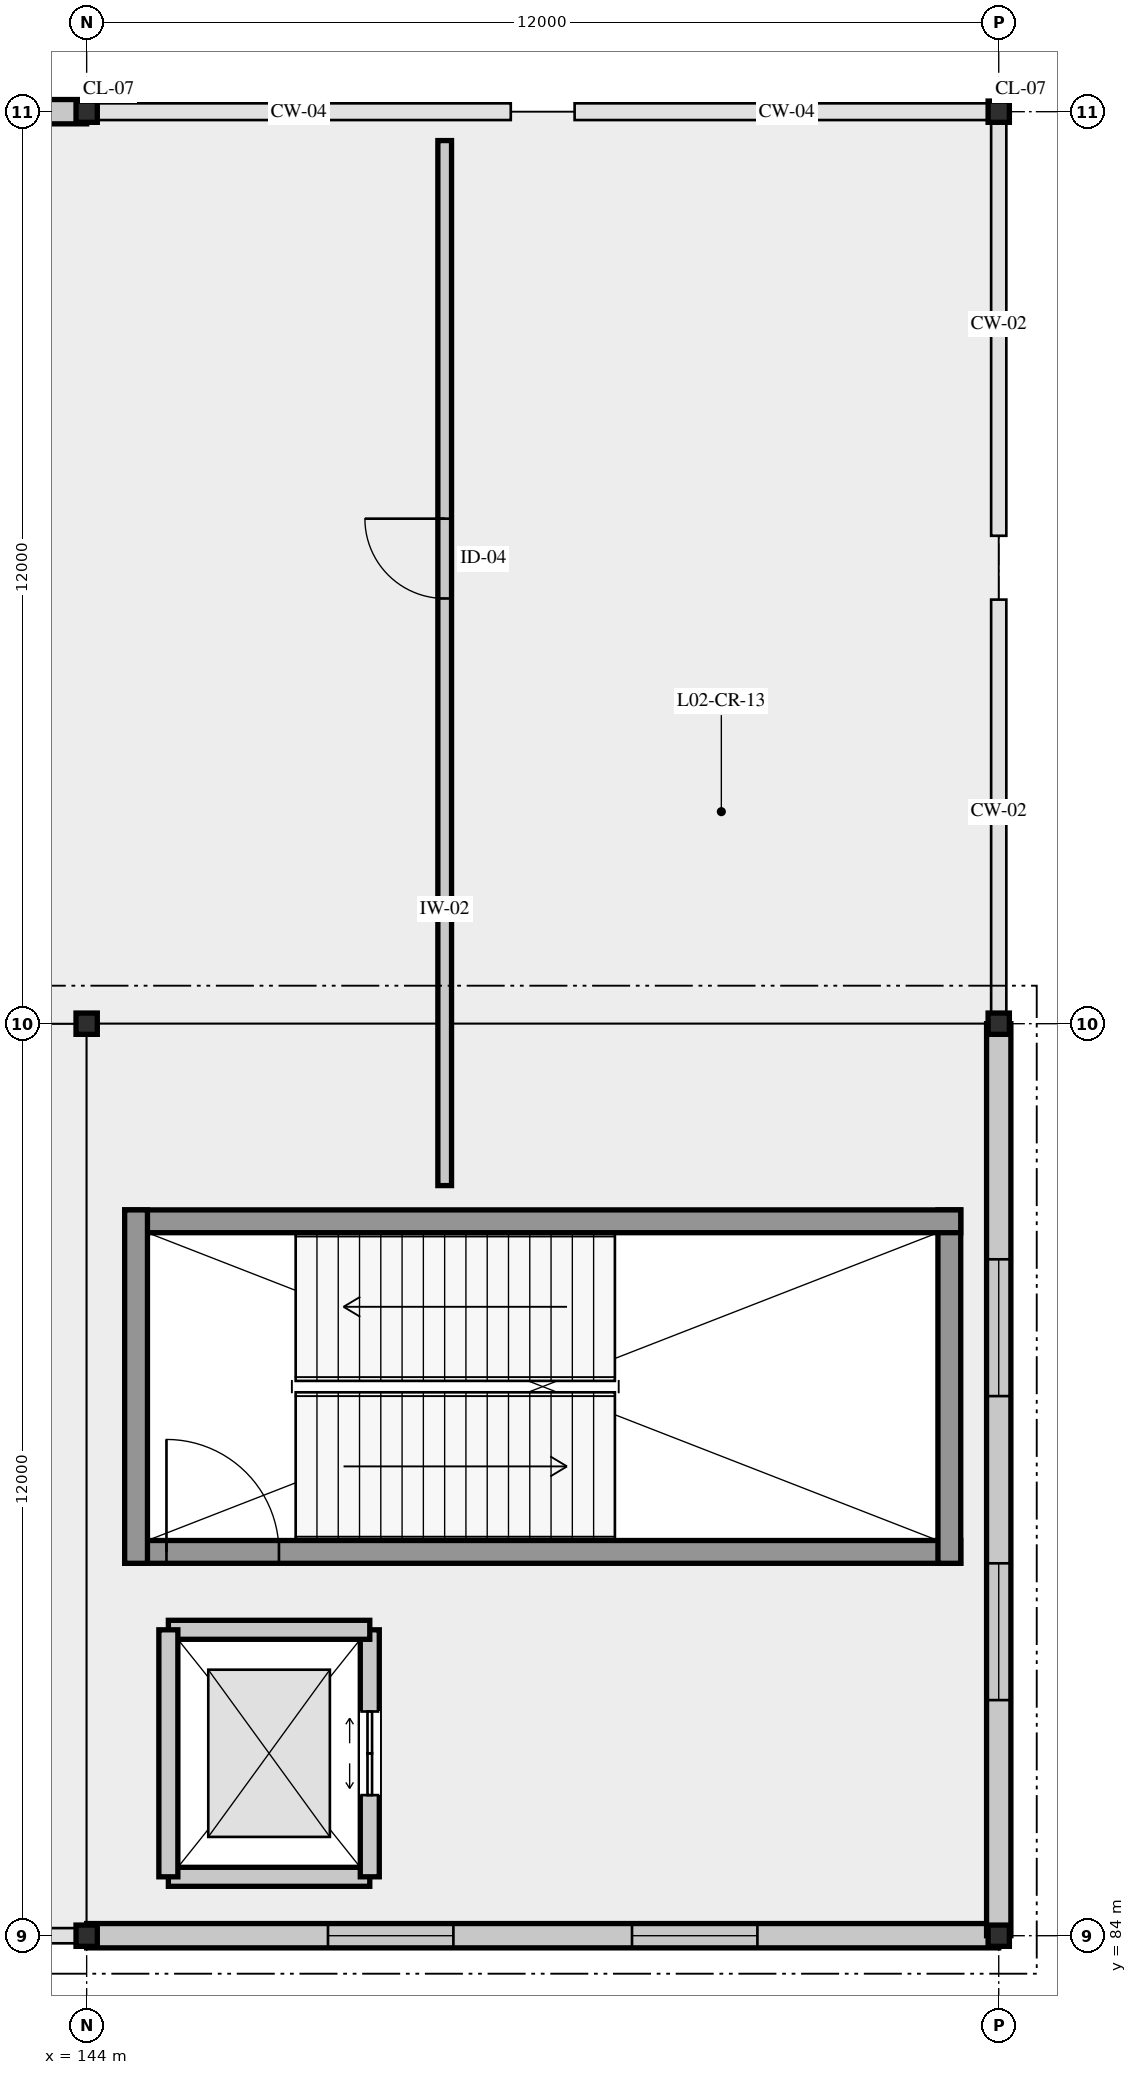
"""IFC4 building model, lengths in metres.
Left out: names, types, materials, properties, quantities, classifications, styles, units other than length and angle.
Written with IfcOpenShell. Run it as: python <this file> out.ifc"""

import sys

from ifc_helpers import new_model, si_unit, direction, frame, frame_2d, origin, origin_2d, place, context, subcontext, project, spatial, rectangle, i_section, extrude, element, fill, save


model = new_model("IFC4")
c1 = context("Model", 3, precision=1e-05, world=origin(), true_north=direction((0.0, 1.0)))
c2 = subcontext(c1, "Body", "Model", "MODEL_VIEW")
j1 = project(units=[si_unit("LENGTHUNIT", "METRE"), si_unit("PLANEANGLEUNIT", "RADIAN")], contexts=[c1])
p1 = place(None, origin())
s1 = spatial("IfcSite", under=j1, at=p1, CompositionType="ELEMENT")
p2 = place(p1, origin())
s2 = spatial("IfcBuilding", under=s1, at=p2, CompositionType="ELEMENT")
p3 = place(p2, frame((0.0, 0.0, 10.8)))
s3 = spatial("IfcBuildingStorey", under=s2, at=p3, CompositionType="ELEMENT", Elevation=10.8)
for number, where, z_axis, x_axis in (
    (1, (144.0, 84.0, 0.0), (0.0, 0.0, 1.0), (1.0, 0.0, 0.0)),
    (2, (144.0, 96.0, 0.0), (0.0, 0.0, 1.0), (1.0, 0.0, 0.0)),
    (3, (144.0, 108.0, 0.0), (0.0, 0.0, 1.0), (1.0, 0.0, 0.0)),
    (4, (156.0, 84.0, 0.0), (0.0, 0.0, 1.0), (1.0, 0.0, 0.0)),
    (5, (156.0, 96.0, 0.0), (0.0, 0.0, 1.0), (1.0, 0.0, 0.0)),
    (6, (156.0, 108.0, 0.0), (0.0, 0.0, 1.0), (1.0, 0.0, 0.0)),
):
    element("IfcColumn", number, at=place(p3, frame(where, z_axis=z_axis, x_axis=x_axis)), inside=s3, PredefinedType="COLUMN", context=c2, shape_type="SweptSolid", body=[
        extrude(i_section(OverallWidth=0.28, OverallDepth=0.28, WebThickness=0.01, FlangeThickness=0.018, FilletRadius=0.024, at=origin_2d()), origin(), (0.0, 0.0, 1.0), 6.0),
    ])
p4 = place(p3, frame((144.0, 108.0, 0.0), z_axis=(0.0, 0.0, 1.0), x_axis=(-1.0, 0.0, 0.0)))
e7 = element("IfcWall", 7, at=p4, inside=s3, PredefinedType="SOLIDWALL", context=c2, shape_type="SweptSolid", body=[
    extrude(rectangle(XDim=12.0, YDim=0.32, at=frame_2d((6.0, 0.0))), origin(), (0.0, 0.0, 1.0), 5.11),
])
p5 = place(p4, frame((3.25, 0.0, 0.95)))
e8 = element("IfcOpeningElement", 8, at=p5, cuts=e7, PredefinedType="OPENING", context=c2, shape_type="SweptSolid", body=[
    extrude(rectangle(XDim=1.5, YDim=1.5, at=frame_2d((0.75, 0.75))), frame((0.0, 0.17, 0.0), z_axis=(0.0, -1.0, 0.0), x_axis=(1.0, 0.0, 0.0)), (0.0, 0.0, 1.0), 0.34),
])
p6 = place(p4, frame((7.25, 0.0, 0.95)))
e9 = element("IfcOpeningElement", 9, at=p6, cuts=e7, PredefinedType="OPENING", context=c2, shape_type="SweptSolid", body=[
    extrude(rectangle(XDim=1.5, YDim=1.5, at=frame_2d((0.75, 0.75))), frame((0.0, 0.17, 0.0), z_axis=(0.0, -1.0, 0.0), x_axis=(1.0, 0.0, 0.0)), (0.0, 0.0, 1.0), 0.34),
])
p7 = place(p3, frame((144.0, 84.0, 0.0), z_axis=(0.0, 0.0, 1.0), x_axis=(1.0, 0.0, 0.0)))
e10 = element("IfcWall", 10, at=p7, inside=s3, PredefinedType="SOLIDWALL", context=c2, shape_type="SweptSolid", body=[
    extrude(rectangle(XDim=12.0, YDim=0.32, at=frame_2d((6.0, 0.0))), origin(), (0.0, 0.0, 1.0), 5.11),
])
p8 = place(p7, frame((3.175, 0.0, 0.95)))
e11 = element("IfcOpeningElement", 11, at=p8, cuts=e10, PredefinedType="OPENING", context=c2, shape_type="SweptSolid", body=[
    extrude(rectangle(XDim=1.65, YDim=1.5, at=frame_2d((0.825, 0.75))), frame((0.0, 0.17, 0.0), z_axis=(0.0, -1.0, 0.0), x_axis=(1.0, 0.0, 0.0)), (0.0, 0.0, 1.0), 0.34),
])
p9 = place(p7, frame((7.175, 0.0, 0.95)))
e12 = element("IfcOpeningElement", 12, at=p9, cuts=e10, PredefinedType="OPENING", context=c2, shape_type="SweptSolid", body=[
    extrude(rectangle(XDim=1.65, YDim=1.5, at=frame_2d((0.825, 0.75))), frame((0.0, 0.17, 0.0), z_axis=(0.0, -1.0, 0.0), x_axis=(1.0, 0.0, 0.0)), (0.0, 0.0, 1.0), 0.34),
])
p10 = place(p3, frame((156.0, 84.0, 0.0), z_axis=(0.0, 0.0, 1.0), x_axis=(0.0, 1.0, 0.0)))
e13 = element("IfcWall", 13, at=p10, inside=s3, PredefinedType="SOLIDWALL", context=c2, shape_type="SweptSolid", body=[
    extrude(rectangle(XDim=12.0, YDim=0.32, at=frame_2d((6.0, 0.0))), origin(), (0.0, 0.0, 1.0), 5.11),
])
p11 = place(p10, frame((3.1, 0.0, 0.95)))
e14 = element("IfcOpeningElement", 14, at=p11, cuts=e13, PredefinedType="OPENING", context=c2, shape_type="SweptSolid", body=[
    extrude(rectangle(XDim=1.8, YDim=1.5, at=frame_2d((0.9, 0.75))), frame((0.0, 0.17, 0.0), z_axis=(0.0, -1.0, 0.0), x_axis=(1.0, 0.0, 0.0)), (0.0, 0.0, 1.0), 0.34),
])
p12 = place(p10, frame((7.1, 0.0, 0.95)))
e15 = element("IfcOpeningElement", 15, at=p12, cuts=e13, PredefinedType="OPENING", context=c2, shape_type="SweptSolid", body=[
    extrude(rectangle(XDim=1.8, YDim=1.5, at=frame_2d((0.9, 0.75))), frame((0.0, 0.17, 0.0), z_axis=(0.0, -1.0, 0.0), x_axis=(1.0, 0.0, 0.0)), (0.0, 0.0, 1.0), 0.34),
])
p13 = place(p3, frame((144.5, 89.05, 0.0), z_axis=(0.0, 0.0, 1.0), x_axis=(1.0, 0.0, 0.0)))
e16 = element("IfcWall", 16, at=p13, inside=s3, PredefinedType="SHEAR", context=c2, shape_type="SweptSolid", body=[
    extrude(rectangle(XDim=11.0, YDim=0.3, at=frame_2d((5.5, 0.0))), origin(), (0.0, 0.0, 1.0), 5.69),
])
p14 = place(p13, frame((0.55, 0.0, 0.0)))
e17 = element("IfcOpeningElement", 17, at=p14, cuts=e16, PredefinedType="OPENING", context=c2, shape_type="SweptSolid", body=[
    extrude(rectangle(XDim=1.48, YDim=2.3, at=frame_2d((0.74, 1.15))), frame((0.0, 0.16, 0.0), z_axis=(0.0, -1.0, 0.0), x_axis=(1.0, 0.0, 0.0)), (0.0, 0.0, 1.0), 0.32),
])
p15 = place(p3, frame((155.35, 88.9, 0.0), z_axis=(0.0, 0.0, 1.0), x_axis=(0.0, 1.0, 0.0)))
e18 = element("IfcWall", 18, at=p15, inside=s3, PredefinedType="SHEAR", context=c2, shape_type="SweptSolid", body=[
    extrude(rectangle(XDim=4.65, YDim=0.3, at=frame_2d((2.325, 0.0))), origin(), (0.0, 0.0, 1.0), 5.69),
])
p16 = place(p3, frame((155.5, 93.4, 0.0), z_axis=(0.0, 0.0, 1.0), x_axis=(-1.0, 0.0, 0.0)))
e19 = element("IfcWall", 19, at=p16, inside=s3, PredefinedType="SHEAR", context=c2, shape_type="SweptSolid", body=[
    extrude(rectangle(XDim=11.0, YDim=0.3, at=frame_2d((5.5, 0.0))), origin(), (0.0, 0.0, 1.0), 5.69),
])
p17 = place(p3, frame((144.65, 93.55, 0.0), z_axis=(0.0, 0.0, 1.0), x_axis=(0.0, -1.0, 0.0)))
e20 = element("IfcWall", 20, at=p17, inside=s3, PredefinedType="SHEAR", context=c2, shape_type="SweptSolid", body=[
    extrude(rectangle(XDim=4.65, YDim=0.3, at=frame_2d((2.325, 0.0))), origin(), (0.0, 0.0, 1.0), 5.69),
])
p18 = place(p3, frame((145.075, 84.775, 0.0), z_axis=(0.0, 0.0, 1.0), x_axis=(1.0, 0.0, 0.0)))
e21 = element("IfcWall", 21, at=p18, inside=s3, PredefinedType="SOLIDWALL", context=c2, shape_type="SweptSolid", body=[
    extrude(rectangle(XDim=2.65, YDim=0.25, at=frame_2d((1.325, 0.0))), origin(), (0.0, 0.0, 1.0), 5.69),
])
p19 = place(p3, frame((147.725, 84.775, 0.0), z_axis=(0.0, 0.0, 1.0), x_axis=(0.0, 1.0, 0.0)))
e22 = element("IfcWall", 22, at=p19, inside=s3, PredefinedType="SOLIDWALL", context=c2, shape_type="SweptSolid", body=[
    extrude(rectangle(XDim=3.25, YDim=0.25, at=frame_2d((1.625, 0.0))), origin(), (0.0, 0.0, 1.0), 5.69),
])
p20 = place(p19, frame((1.075, 0.0, 0.0)))
e23 = element("IfcOpeningElement", 23, at=p20, cuts=e22, PredefinedType="OPENING", context=c2, shape_type="SweptSolid", body=[
    extrude(rectangle(XDim=1.1, YDim=2.2, at=frame_2d((0.55, 1.1))), frame((0.0, 0.135, 0.0), z_axis=(0.0, -1.0, 0.0), x_axis=(1.0, 0.0, 0.0)), (0.0, 0.0, 1.0), 0.27),
])
p21 = place(p3, frame((147.725, 88.025, 0.0), z_axis=(0.0, 0.0, 1.0), x_axis=(-1.0, 0.0, 0.0)))
e24 = element("IfcWall", 24, at=p21, inside=s3, PredefinedType="SOLIDWALL", context=c2, shape_type="SweptSolid", body=[
    extrude(rectangle(XDim=2.65, YDim=0.25, at=frame_2d((1.325, 0.0))), origin(), (0.0, 0.0, 1.0), 5.69),
])
p22 = place(p3, frame((145.075, 88.025, 0.0), z_axis=(0.0, 0.0, 1.0), x_axis=(0.0, -1.0, 0.0)))
e25 = element("IfcWall", 25, at=p22, inside=s3, PredefinedType="SOLIDWALL", context=c2, shape_type="SweptSolid", body=[
    extrude(rectangle(XDim=3.25, YDim=0.25, at=frame_2d((1.625, 0.0))), origin(), (0.0, 0.0, 1.0), 5.69),
])
p23 = place(p3, frame((148.711, 93.87, 0.0), z_axis=(0.0, 0.0, 1.0), x_axis=(0.0, 1.0, 0.0)))
e26 = element("IfcWall", 26, at=p23, inside=s3, PredefinedType="PARTITIONING", context=c2, shape_type="SweptSolid", body=[
    extrude(rectangle(XDim=13.75, YDim=0.18, at=frame_2d((6.875, 0.0))), origin(), (0.0, 0.0, 1.0), 5.18),
])
p24 = place(p23, frame((7.725, 0.0, 0.0)))
e27 = element("IfcOpeningElement", 27, at=p24, cuts=e26, PredefinedType="OPENING", context=c2, shape_type="SweptSolid", body=[
    extrude(rectangle(XDim=1.05, YDim=2.2, at=frame_2d((0.525, 1.1))), frame((0.0, 0.1, 0.0), z_axis=(0.0, -1.0, 0.0), x_axis=(1.0, 0.0, 0.0)), (0.0, 0.0, 1.0), 0.2),
])
p25 = place(p8, origin())
e28 = element("IfcWindow", 28, at=p25, inside=s3, PartitioningType="SINGLE_PANEL", PredefinedType="WINDOW", context=c2, shape_type="SweptSolid", body=[
    extrude(rectangle(XDim=1.65, YDim=1.5, at=frame_2d((0.825, 0.75))), frame((0.0, 0.03, 0.0), z_axis=(0.0, -1.0, 0.0), x_axis=(1.0, 0.0, 0.0)), (0.0, 0.0, 1.0), 0.06),
])
fill(e11, e28)
p26 = place(p9, origin())
e29 = element("IfcWindow", 29, at=p26, inside=s3, PartitioningType="SINGLE_PANEL", PredefinedType="WINDOW", context=c2, shape_type="SweptSolid", body=[
    extrude(rectangle(XDim=1.65, YDim=1.5, at=frame_2d((0.825, 0.75))), frame((0.0, 0.03, 0.0), z_axis=(0.0, -1.0, 0.0), x_axis=(1.0, 0.0, 0.0)), (0.0, 0.0, 1.0), 0.06),
])
fill(e12, e29)
p27 = place(p11, origin())
e30 = element("IfcWindow", 30, at=p27, inside=s3, PartitioningType="SINGLE_PANEL", PredefinedType="WINDOW", context=c2, shape_type="SweptSolid", body=[
    extrude(rectangle(XDim=1.8, YDim=1.5, at=frame_2d((0.9, 0.75))), frame((0.0, 0.03, 0.0), z_axis=(0.0, -1.0, 0.0), x_axis=(1.0, 0.0, 0.0)), (0.0, 0.0, 1.0), 0.06),
])
fill(e14, e30)
p28 = place(p12, origin())
e31 = element("IfcWindow", 31, at=p28, inside=s3, PartitioningType="SINGLE_PANEL", PredefinedType="WINDOW", context=c2, shape_type="SweptSolid", body=[
    extrude(rectangle(XDim=1.8, YDim=1.5, at=frame_2d((0.9, 0.75))), frame((0.0, 0.03, 0.0), z_axis=(0.0, -1.0, 0.0), x_axis=(1.0, 0.0, 0.0)), (0.0, 0.0, 1.0), 0.06),
])
fill(e15, e31)
p29 = place(p14, origin())
e32 = element("IfcDoor", 32, at=p29, inside=s3, OperationType="DOUBLE_DOOR_SINGLE_SWING", PredefinedType="DOOR", context=c2, shape_type="SweptSolid", body=[
    extrude(rectangle(XDim=1.48, YDim=2.3, at=frame_2d((0.74, 1.15))), frame((0.0, 0.025, 0.0), z_axis=(0.0, -1.0, 0.0), x_axis=(1.0, 0.0, 0.0)), (0.0, 0.0, 1.0), 0.05),
])
fill(e17, e32)
p30 = place(p20, origin())
e33 = element("IfcDoor", 33, at=p30, inside=s3, OperationType="SLIDING_TO_LEFT", PredefinedType="DOOR", context=c2, shape_type="SweptSolid", body=[
    extrude(rectangle(XDim=1.1, YDim=2.2, at=frame_2d((0.55, 1.1))), frame((0.0, 0.025, 0.0), z_axis=(0.0, -1.0, 0.0), x_axis=(1.0, 0.0, 0.0)), (0.0, 0.0, 1.0), 0.05),
])
fill(e23, e33)
p31 = place(p24, origin())
e34 = element("IfcDoor", 34, at=p31, inside=s3, OperationType="SINGLE_SWING_RIGHT", PredefinedType="DOOR", context=c2, shape_type="SweptSolid", body=[
    extrude(rectangle(XDim=1.05, YDim=2.2, at=frame_2d((0.525, 1.1))), frame((0.0, 0.025, 0.0), z_axis=(0.0, -1.0, 0.0), x_axis=(1.0, 0.0, 0.0)), (0.0, 0.0, 1.0), 0.05),
])
fill(e27, e34)
save(model, sys.argv[1])
